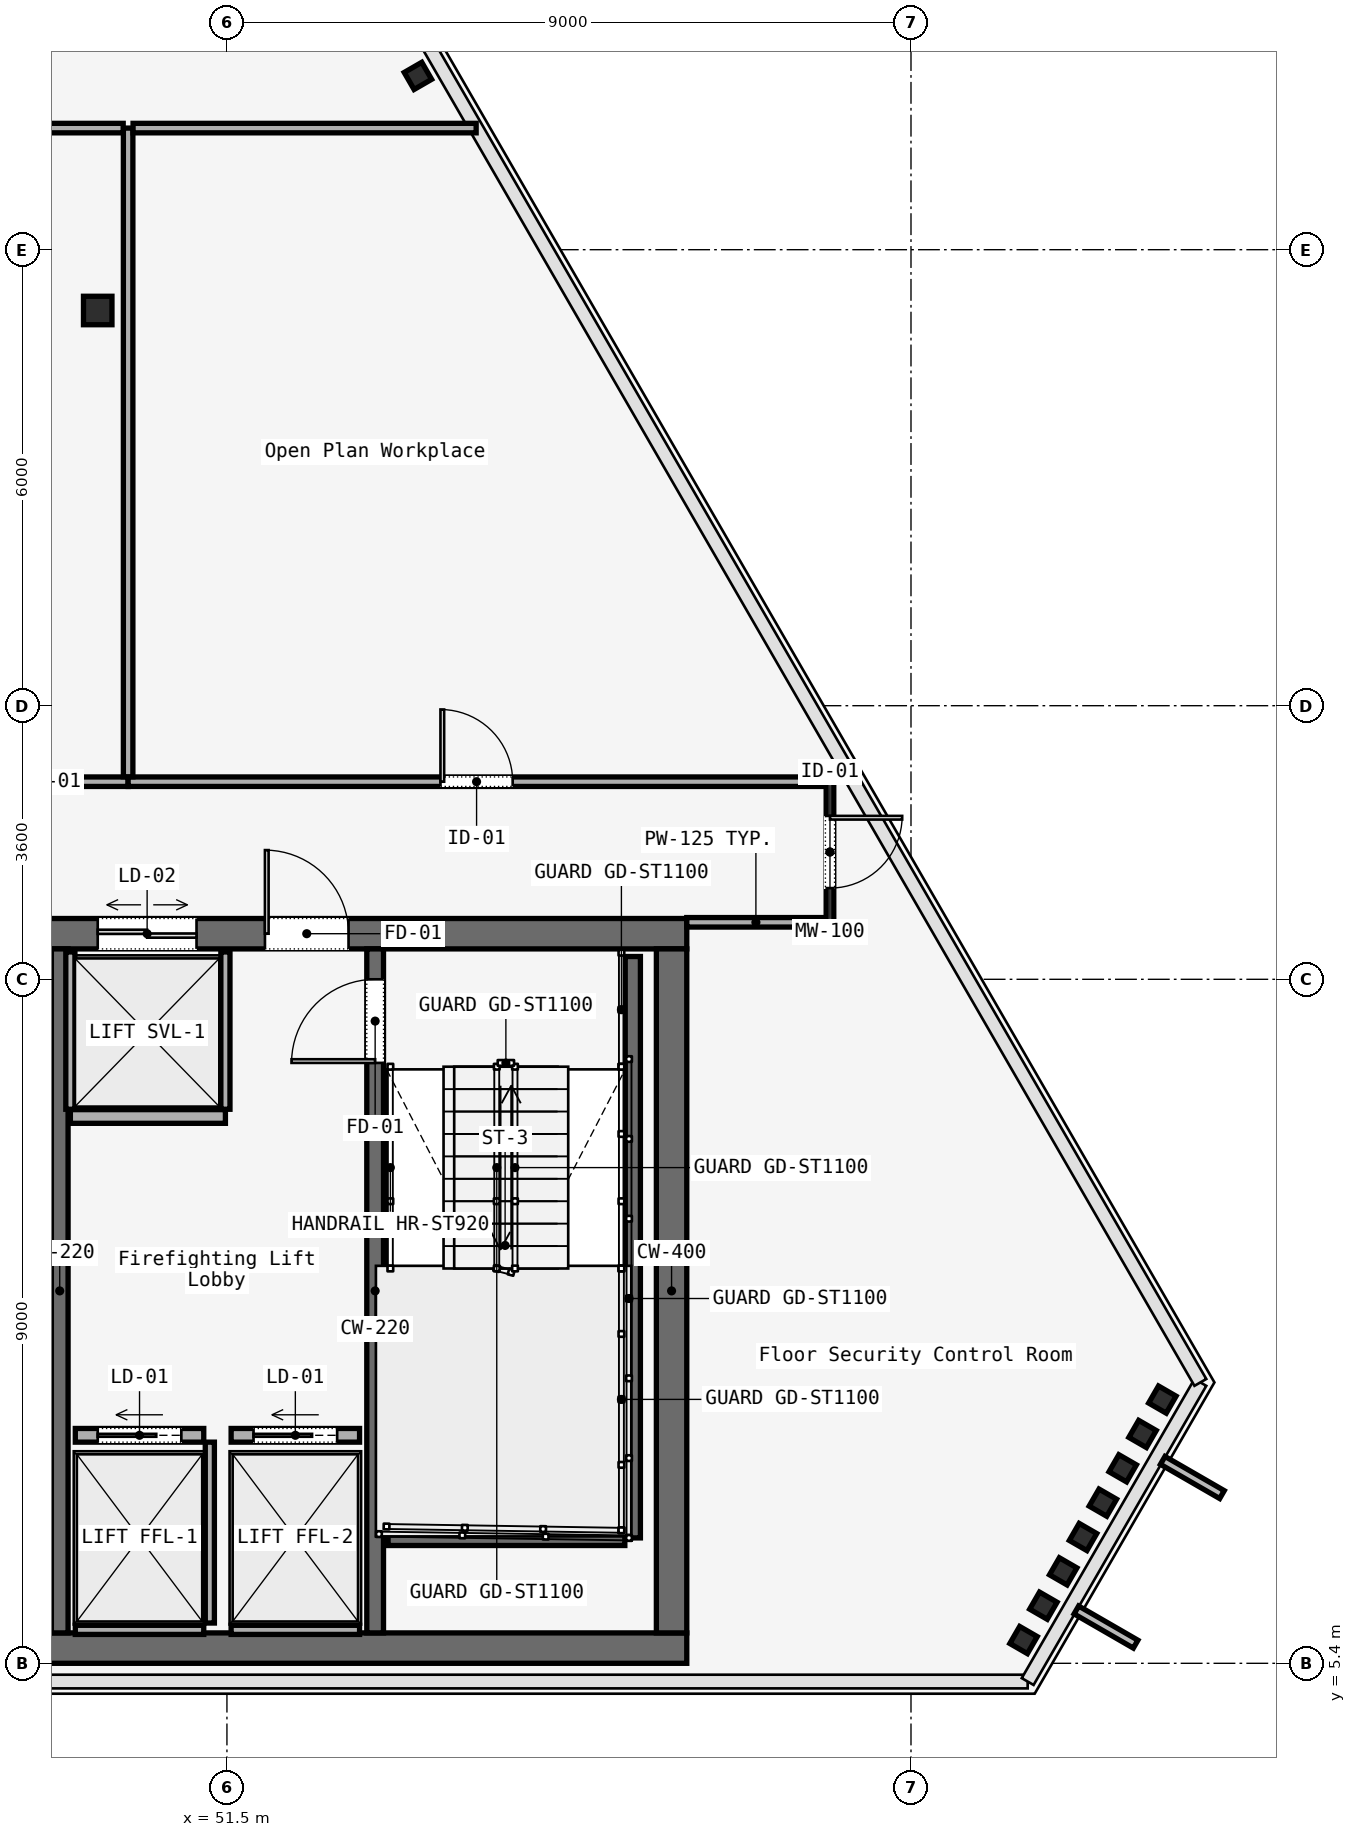
"""IFC4 building model, lengths in metres.
Left out: names, types, materials, properties, quantities, classifications, styles, units other than length and angle.
Written with IfcOpenShell. Run it as: python <this file> out.ifc"""

import sys

from ifc_helpers import new_model, si_unit, direction, frame, frame_2d, origin, origin_2d, place, context, subcontext, project, spatial, rectangle, i_section, extrude, element, fill, save


model = new_model("IFC4")
c1 = context("Model", 3, precision=1e-05, world=origin(), true_north=direction((0.0, 1.0)))
c2 = subcontext(c1, "Body", "Model", "MODEL_VIEW")
j1 = project(units=[si_unit("LENGTHUNIT", "METRE"), si_unit("PLANEANGLEUNIT", "RADIAN")], contexts=[c1])
p1 = place(None, origin())
s1 = spatial("IfcSite", under=j1, at=p1, CompositionType="ELEMENT")
p2 = place(p1, origin())
s2 = spatial("IfcBuilding", under=s1, at=p2, CompositionType="ELEMENT")
p3 = place(p2, frame((0.0, 0.0, 287.1)))
s3 = spatial("IfcBuildingStorey", under=s2, at=p3, CompositionType="ELEMENT", Elevation=287.1)
p4 = place(p3, frame((26.45, 15.0, 0.0), z_axis=(0.0, 0.0, 1.0), x_axis=(1.0, 0.0, 0.0)))
e1 = element("IfcWall", 1, at=p4, inside=s3, PredefinedType="SOLIDWALL", context=c2, shape_type="SweptSolid", body=[
    extrude(rectangle(XDim=31.1, YDim=0.4, at=frame_2d((15.55, 0.0))), origin(), (0.0, 0.0, 1.0), 3.58),
])
p5 = place(p4, frame((1.65, 0.0, 0.0)))
e2 = element("IfcOpeningElement", 2, at=p5, cuts=e1, PredefinedType="OPENING", context=c2, shape_type="SweptSolid", body=[
    extrude(rectangle(XDim=1.1, YDim=2.2, at=frame_2d((0.55, 1.1))), frame((0.0, 0.2, 0.0), z_axis=(0.0, -1.0, 0.0), x_axis=(1.0, 0.0, 0.0)), (0.0, 0.0, 1.0), 0.4),
])
p6 = place(p4, frame((13.65, 0.0, 0.0)))
e3 = element("IfcOpeningElement", 3, at=p6, cuts=e1, PredefinedType="OPENING", context=c2, shape_type="SweptSolid", body=[
    extrude(rectangle(XDim=1.1, YDim=2.2, at=frame_2d((0.55, 1.1))), frame((0.0, 0.2, 0.0), z_axis=(0.0, -1.0, 0.0), x_axis=(1.0, 0.0, 0.0)), (0.0, 0.0, 1.0), 0.4),
])
p7 = place(p4, frame((25.55, 0.0, 0.0)))
e4 = element("IfcOpeningElement", 4, at=p7, cuts=e1, PredefinedType="OPENING", context=c2, shape_type="SweptSolid", body=[
    extrude(rectangle(XDim=1.1, YDim=2.2, at=frame_2d((0.55, 1.1))), frame((0.0, 0.2, 0.0), z_axis=(0.0, -1.0, 0.0), x_axis=(1.0, 0.0, 0.0)), (0.0, 0.0, 1.0), 0.4),
])
p8 = place(p4, frame((19.35, 0.0, 0.0)))
e5 = element("IfcOpeningElement", 5, at=p8, cuts=e1, PredefinedType="OPENING", context=c2, shape_type="SweptSolid", body=[
    extrude(rectangle(XDim=1.1, YDim=2.2, at=frame_2d((0.55, 1.1))), frame((0.0, 0.2, 0.0), z_axis=(0.0, -1.0, 0.0), x_axis=(1.0, 0.0, 0.0)), (0.0, 0.0, 1.0), 0.4),
])
p9 = place(p4, frame((21.4, 0.0, 0.0)))
e6 = element("IfcOpeningElement", 6, at=p9, cuts=e1, PredefinedType="OPENING", context=c2, shape_type="SweptSolid", body=[
    extrude(rectangle(XDim=0.9, YDim=2.1, at=frame_2d((0.45, 1.05))), frame((0.0, 0.2, 0.0), z_axis=(0.0, -1.0, 0.0), x_axis=(1.0, 0.0, 0.0)), (0.0, 0.0, 1.0), 0.4),
])
p10 = place(p4, frame((6.04, 0.0, 0.0)))
e7 = element("IfcOpeningElement", 7, at=p10, cuts=e1, PredefinedType="OPENING", context=c2, shape_type="SweptSolid", body=[
    extrude(rectangle(XDim=0.95, YDim=2.2, at=frame_2d((0.475, 1.1))), frame((0.0, 0.2, 0.0), z_axis=(0.0, -1.0, 0.0), x_axis=(1.0, 0.0, 0.0)), (0.0, 0.0, 1.0), 0.4),
])
p11 = place(p4, frame((9.99, 0.0, 0.0)))
e8 = element("IfcOpeningElement", 8, at=p11, cuts=e1, PredefinedType="OPENING", context=c2, shape_type="SweptSolid", body=[
    extrude(rectangle(XDim=0.95, YDim=2.2, at=frame_2d((0.475, 1.1))), frame((0.0, 0.2, 0.0), z_axis=(0.0, -1.0, 0.0), x_axis=(1.0, 0.0, 0.0)), (0.0, 0.0, 1.0), 0.4),
])
p12 = place(p4, frame((23.35, 0.0, 0.0)))
e9 = element("IfcOpeningElement", 9, at=p12, cuts=e1, PredefinedType="OPENING", context=c2, shape_type="SweptSolid", body=[
    extrude(rectangle(XDim=1.3, YDim=2.3, at=frame_2d((0.65, 1.15))), frame((0.0, 0.2, 0.0), z_axis=(0.0, -1.0, 0.0), x_axis=(1.0, 0.0, 0.0)), (0.0, 0.0, 1.0), 0.4),
])
p13 = place(p3, frame((26.45, 5.6, 0.0), z_axis=(0.0, 0.0, 1.0), x_axis=(1.0, 0.0, 0.0)))
e10 = element("IfcWall", 10, at=p13, inside=s3, PredefinedType="SOLIDWALL", context=c2, shape_type="SweptSolid", body=[
    extrude(rectangle(XDim=31.1, YDim=0.4, at=frame_2d((15.55, 0.0))), origin(), (0.0, 0.0, 1.0), 3.58),
])
p14 = place(p3, frame((57.35, 5.8, 0.0), z_axis=(0.0, 0.0, 1.0), x_axis=(0.0, 1.0, 0.0)))
e11 = element("IfcWall", 11, at=p14, inside=s3, PredefinedType="SOLIDWALL", context=c2, shape_type="SweptSolid", body=[
    extrude(rectangle(XDim=9.0, YDim=0.4, at=frame_2d((4.5, 0.0))), origin(), (0.0, 0.0, 1.0), 3.58),
])
p15 = place(p3, frame((49.3, 5.8, 0.0), z_axis=(0.0, 0.0, 1.0), x_axis=(0.0, 1.0, 0.0)))
e12 = element("IfcWall", 12, at=p15, inside=s3, PredefinedType="SOLIDWALL", context=c2, shape_type="SweptSolid", body=[
    extrude(rectangle(XDim=9.0, YDim=0.22, at=frame_2d((4.5, 0.0))), origin(), (0.0, 0.0, 1.0), 3.58),
])
p16 = place(p3, frame((53.45, 5.8, 0.0), z_axis=(0.0, 0.0, 1.0), x_axis=(0.0, 1.0, 0.0)))
e13 = element("IfcWall", 13, at=p16, inside=s3, PredefinedType="SOLIDWALL", context=c2, shape_type="SweptSolid", body=[
    extrude(rectangle(XDim=9.0, YDim=0.22, at=frame_2d((4.5, 0.0))), origin(), (0.0, 0.0, 1.0), 3.58),
])
p17 = place(p16, frame((7.5, 0.0, 0.0)))
e14 = element("IfcOpeningElement", 14, at=p17, cuts=e13, PredefinedType="OPENING", context=c2, shape_type="SweptSolid", body=[
    extrude(rectangle(XDim=1.1, YDim=2.2, at=frame_2d((0.55, 1.1))), frame((0.0, 0.11, 0.0), z_axis=(0.0, -1.0, 0.0), x_axis=(1.0, 0.0, 0.0)), (0.0, 0.0, 1.0), 0.22),
])
p18 = place(p3, frame((49.8, 23.2, 0.0), z_axis=(0.0, 0.0, 1.0), x_axis=(1.0, 0.0, 0.0)))
e15 = element("IfcColumn", 15, at=p18, inside=s3, PredefinedType="COLUMN", context=c2, shape_type="SweptSolid", body=[
    extrude(i_section(OverallWidth=0.375, OverallDepth=0.375, WebThickness=0.017, FlangeThickness=0.027, FilletRadius=0.015, at=origin_2d()), origin(), (0.0, 0.0, 1.0), 3.58),
])
for number, where, z_axis, x_axis in (
    (16, (61.981, 5.706, 0.0), (0.0, 0.0, 1.0), (0.5, 0.866, 0.0)),
    (17, (62.242, 6.158, 0.0), (0.0, 0.0, 1.0), (0.5, 0.866, 0.0)),
    (18, (62.503, 6.61, 0.0), (0.0, 0.0, 1.0), (0.5, 0.866, 0.0)),
    (19, (62.764, 7.062, 0.0), (0.0, 0.0, 1.0), (0.5, 0.866, 0.0)),
    (20, (63.025, 7.514, 0.0), (0.0, 0.0, 1.0), (0.5, 0.866, 0.0)),
    (21, (63.286, 7.966, 0.0), (0.0, 0.0, 1.0), (0.5, 0.866, 0.0)),
    (22, (63.546, 8.418, 0.0), (0.0, 0.0, 1.0), (0.5, 0.866, 0.0)),
    (23, (63.807, 8.87, 0.0), (0.0, 0.0, 1.0), (0.5, 0.866, 0.0)),
    (24, (54.013, 26.287, 0.0), (0.0, 0.0, 1.0), (-0.5, 0.866, 0.0)),
):
    element("IfcColumn", number, at=place(p3, frame(where, z_axis=z_axis, x_axis=x_axis)), inside=s3, PredefinedType="COLUMN", context=c2, shape_type="SweptSolid", body=[
        extrude(i_section(OverallWidth=0.259, OverallDepth=0.267, WebThickness=0.013, FlangeThickness=0.021, FilletRadius=0.013, at=origin_2d()), origin(), (0.0, 0.0, 1.0), 3.58),
    ])
p19 = place(p3, frame((56.84, 14.7, 0.0), z_axis=(0.0, 0.0, 1.0), x_axis=(0.0, -1.0, 0.0)))
e25 = element("IfcWall", 25, at=p19, inside=s3, PredefinedType="SOLIDWALL", context=c2, shape_type="SweptSolid", body=[
    extrude(rectangle(XDim=7.65, YDim=0.2, at=frame_2d((3.825, 0.0))), origin(), (0.0, 0.0, 1.0), 3.8),
])
p20 = place(p3, frame((53.62, 7.05, 0.0), z_axis=(0.0, 0.0, 1.0), x_axis=(1.0, 0.0, 0.0)))
e26 = element("IfcWall", 26, at=p20, inside=s3, PredefinedType="SOLIDWALL", context=c2, shape_type="SweptSolid", body=[
    extrude(rectangle(XDim=3.115, YDim=0.2, at=frame_2d((1.558, 0.0))), origin(), (0.0, 0.0, 1.0), 3.8),
])
p21 = place(p3, frame((49.505, 8.4, 0.0), z_axis=(0.0, 0.0, 1.0), x_axis=(1.0, 0.0, 0.0)))
e27 = element("IfcWall", 27, at=p21, inside=s3, PredefinedType="SOLIDWALL", context=c2, shape_type="SweptSolid", body=[
    extrude(rectangle(XDim=1.69, YDim=0.18, at=frame_2d((0.845, 0.0))), origin(), (0.0, 0.0, 1.0), 3.01),
])
p22 = place(p21, frame((0.295, 0.0, 0.0)))
e28 = element("IfcOpeningElement", 28, at=p22, cuts=e27, PredefinedType="OPENING", context=c2, shape_type="SweptSolid", body=[
    extrude(rectangle(XDim=1.1, YDim=2.2, at=frame_2d((0.55, 1.1))), frame((0.0, 0.09, 0.0), z_axis=(0.0, -1.0, 0.0), x_axis=(1.0, 0.0, 0.0)), (0.0, 0.0, 1.0), 0.18),
])
p23 = place(p3, frame((49.505, 5.84, 0.0), z_axis=(0.0, 0.0, 1.0), x_axis=(1.0, 0.0, 0.0)))
e29 = element("IfcWall", 29, at=p23, inside=s3, PredefinedType="SOLIDWALL", context=c2, shape_type="SweptSolid", body=[
    extrude(rectangle(XDim=1.69, YDim=0.12, at=frame_2d((0.845, 0.0))), origin(), (0.0, 0.0, 1.0), 3.01),
])
p24 = place(p3, frame((51.275, 5.93, 0.0), z_axis=(0.0, 0.0, 1.0), x_axis=(0.0, 1.0, 0.0)))
e30 = element("IfcWall", 30, at=p24, inside=s3, PredefinedType="SOLIDWALL", context=c2, shape_type="SweptSolid", body=[
    extrude(rectangle(XDim=2.38, YDim=0.12, at=frame_2d((1.19, 0.0))), origin(), (0.0, 0.0, 1.0), 3.01),
])
p25 = place(p3, frame((51.555, 8.4, 0.0), z_axis=(0.0, 0.0, 1.0), x_axis=(1.0, 0.0, 0.0)))
e31 = element("IfcWall", 31, at=p25, inside=s3, PredefinedType="SOLIDWALL", context=c2, shape_type="SweptSolid", body=[
    extrude(rectangle(XDim=1.69, YDim=0.18, at=frame_2d((0.845, 0.0))), origin(), (0.0, 0.0, 1.0), 3.01),
])
p26 = place(p25, frame((0.295, 0.0, 0.0)))
e32 = element("IfcOpeningElement", 32, at=p26, cuts=e31, PredefinedType="OPENING", context=c2, shape_type="SweptSolid", body=[
    extrude(rectangle(XDim=1.1, YDim=2.2, at=frame_2d((0.55, 1.1))), frame((0.0, 0.09, 0.0), z_axis=(0.0, -1.0, 0.0), x_axis=(1.0, 0.0, 0.0)), (0.0, 0.0, 1.0), 0.18),
])
p27 = place(p3, frame((51.555, 5.84, 0.0), z_axis=(0.0, 0.0, 1.0), x_axis=(1.0, 0.0, 0.0)))
e33 = element("IfcWall", 33, at=p27, inside=s3, PredefinedType="SOLIDWALL", context=c2, shape_type="SweptSolid", body=[
    extrude(rectangle(XDim=1.69, YDim=0.12, at=frame_2d((0.845, 0.0))), origin(), (0.0, 0.0, 1.0), 3.01),
])
p28 = place(p3, frame((49.44, 12.595, 0.0), z_axis=(0.0, 0.0, 1.0), x_axis=(1.0, 0.0, 0.0)))
e34 = element("IfcWall", 34, at=p28, inside=s3, PredefinedType="SOLIDWALL", context=c2, shape_type="SweptSolid", body=[
    extrude(rectangle(XDim=2.04, YDim=0.18, at=frame_2d((1.02, 0.0))), origin(), (0.0, 0.0, 1.0), 3.01),
])
for number, where, z_axis, x_axis in (
    (35, (49.44, 12.69, 0.0), (0.0, 0.0, 1.0), (0.0, 1.0, 0.0)),
    (36, (51.48, 12.69, 0.0), (0.0, 0.0, 1.0), (0.0, 1.0, 0.0)),
):
    element("IfcWall", number, at=place(p3, frame(where, z_axis=z_axis, x_axis=x_axis)), inside=s3, PredefinedType="SOLIDWALL", context=c2, shape_type="SweptSolid", body=[
        extrude(rectangle(XDim=2.07, YDim=0.12, at=frame_2d((1.035, 0.0))), origin(), (0.0, 0.0, 1.0), 3.01),
    ])
p29 = place(p3, frame((59.434, 17.0, 0.0), z_axis=(0.0, 0.0, 1.0), x_axis=(0.0, -1.0, 0.0)))
e37 = element("IfcWall", 37, at=p29, inside=s3, PredefinedType="MOVABLE", context=c2, shape_type="SweptSolid", body=[
    extrude(rectangle(XDim=1.85, YDim=0.1, at=frame_2d((0.925, 0.0))), origin(), (0.0, 0.0, 1.0), 3.01),
])
p30 = place(p29, frame((0.45, 0.0, 0.0)))
e38 = element("IfcOpeningElement", 38, at=p30, cuts=e37, PredefinedType="OPENING", context=c2, shape_type="SweptSolid", body=[
    extrude(rectangle(XDim=0.95, YDim=2.2, at=frame_2d((0.475, 1.1))), frame((0.0, 0.05, 0.0), z_axis=(0.0, -1.0, 0.0), x_axis=(1.0, 0.0, 0.0)), (0.0, 0.0, 1.0), 0.1),
])
p31 = place(p3, frame((59.369, 15.15, 0.0), z_axis=(0.0, 0.0, 1.0), x_axis=(-1.0, 0.0, 0.0)))
e39 = element("IfcWall", 39, at=p31, inside=s3, PredefinedType="PARTITIONING", context=c2, shape_type="SweptSolid", body=[
    extrude(rectangle(XDim=1.819, YDim=0.125, at=frame_2d((0.909, 0.0))), origin(), (0.0, 0.0, 1.0), 3.01),
])
p32 = place(p3, frame((45.4, 17.0, 0.0), z_axis=(0.0, 0.0, 1.0), x_axis=(1.0, 0.0, 0.0)))
e40 = element("IfcWall", 40, at=p32, inside=s3, PredefinedType="PARTITIONING", context=c2, shape_type="SweptSolid", body=[
    extrude(rectangle(XDim=4.8, YDim=0.125, at=frame_2d((2.4, 0.0))), origin(), (0.0, 0.0, 1.0), 3.01),
])
p33 = place(p32, frame((1.925, 0.0, 0.0)))
e41 = element("IfcOpeningElement", 41, at=p33, cuts=e40, PredefinedType="OPENING", context=c2, shape_type="SweptSolid", body=[
    extrude(rectangle(XDim=0.95, YDim=2.2, at=frame_2d((0.475, 1.1))), frame((0.0, 0.062, 0.0), z_axis=(0.0, -1.0, 0.0), x_axis=(1.0, 0.0, 0.0)), (0.0, 0.0, 1.0), 0.125),
])
p34 = place(p3, frame((50.2, 17.0, 0.0), z_axis=(0.0, 0.0, 1.0), x_axis=(1.0, 0.0, 0.0)))
e42 = element("IfcWall", 42, at=p34, inside=s3, PredefinedType="PARTITIONING", context=c2, shape_type="SweptSolid", body=[
    extrude(rectangle(XDim=9.169, YDim=0.125, at=frame_2d((4.584, 0.0))), origin(), (0.0, 0.0, 1.0), 3.01),
])
p35 = place(p34, frame((4.11, 0.0, 0.0)))
e43 = element("IfcOpeningElement", 43, at=p35, cuts=e42, PredefinedType="OPENING", context=c2, shape_type="SweptSolid", body=[
    extrude(rectangle(XDim=0.95, YDim=2.2, at=frame_2d((0.475, 1.1))), frame((0.0, 0.062, 0.0), z_axis=(0.0, -1.0, 0.0), x_axis=(1.0, 0.0, 0.0)), (0.0, 0.0, 1.0), 0.125),
])
p36 = place(p3, frame((50.2, 17.065, 0.0), z_axis=(0.0, 0.0, 1.0), x_axis=(0.0, 1.0, 0.0)))
e44 = element("IfcWall", 44, at=p36, inside=s3, PredefinedType="PARTITIONING", context=c2, shape_type="SweptSolid", body=[
    extrude(rectangle(XDim=8.535, YDim=0.125, at=frame_2d((4.268, 0.0))), origin(), (0.0, 0.0, 1.0), 3.01),
])
p37 = place(p3, frame((50.265, 25.6, 0.0), z_axis=(0.0, 0.0, 1.0), x_axis=(1.0, 0.0, 0.0)))
e45 = element("IfcWall", 45, at=p37, inside=s3, PredefinedType="PARTITIONING", context=c2, shape_type="SweptSolid", body=[
    extrude(rectangle(XDim=4.514, YDim=0.125, at=frame_2d((2.257, 0.0))), origin(), (0.0, 0.0, 1.0), 3.01),
])
p38 = place(p3, frame((47.2, 25.6, 0.0), z_axis=(0.0, 0.0, 1.0), x_axis=(1.0, 0.0, 0.0)))
e46 = element("IfcWall", 46, at=p38, inside=s3, PredefinedType="PARTITIONING", context=c2, shape_type="SweptSolid", body=[
    extrude(rectangle(XDim=2.935, YDim=0.125, at=frame_2d((1.468, 0.0))), origin(), (0.0, 0.0, 1.0), 3.01),
])
p39 = place(p7, origin())
e47 = element("IfcDoor", 47, at=p39, inside=s3, OperationType="SINGLE_SWING_RIGHT", PredefinedType="DOOR", context=c2, shape_type="SweptSolid", body=[
    extrude(rectangle(XDim=1.1, YDim=2.2, at=frame_2d((0.55, 1.1))), frame((0.0, 0.025, 0.0), z_axis=(0.0, -1.0, 0.0), x_axis=(1.0, 0.0, 0.0)), (0.0, 0.0, 1.0), 0.05),
])
fill(e4, e47)
p40 = place(p17, origin())
e48 = element("IfcDoor", 48, at=p40, inside=s3, OperationType="SINGLE_SWING_LEFT", PredefinedType="DOOR", context=c2, shape_type="SweptSolid", body=[
    extrude(rectangle(XDim=1.1, YDim=2.2, at=frame_2d((0.55, 1.1))), frame((0.0, 0.025, 0.0), z_axis=(0.0, -1.0, 0.0), x_axis=(1.0, 0.0, 0.0)), (0.0, 0.0, 1.0), 0.05),
])
fill(e14, e48)
p41 = place(p22, origin())
e49 = element("IfcDoor", 49, at=p41, inside=s3, OperationType="SLIDING_TO_LEFT", PredefinedType="DOOR", context=c2, shape_type="SweptSolid", body=[
    extrude(rectangle(XDim=1.1, YDim=2.2, at=frame_2d((0.55, 1.1))), frame((0.0, 0.025, 0.0), z_axis=(0.0, -1.0, 0.0), x_axis=(1.0, 0.0, 0.0)), (0.0, 0.0, 1.0), 0.05),
])
fill(e28, e49)
p42 = place(p26, origin())
e50 = element("IfcDoor", 50, at=p42, inside=s3, OperationType="SLIDING_TO_LEFT", PredefinedType="DOOR", context=c2, shape_type="SweptSolid", body=[
    extrude(rectangle(XDim=1.1, YDim=2.2, at=frame_2d((0.55, 1.1))), frame((0.0, 0.025, 0.0), z_axis=(0.0, -1.0, 0.0), x_axis=(1.0, 0.0, 0.0)), (0.0, 0.0, 1.0), 0.05),
])
fill(e32, e50)
p43 = place(p12, origin())
e51 = element("IfcDoor", 51, at=p43, inside=s3, OperationType="DOUBLE_DOOR_SLIDING", PredefinedType="DOOR", context=c2, shape_type="SweptSolid", body=[
    extrude(rectangle(XDim=1.3, YDim=2.3, at=frame_2d((0.65, 1.15))), frame((0.0, 0.025, 0.0), z_axis=(0.0, -1.0, 0.0), x_axis=(1.0, 0.0, 0.0)), (0.0, 0.0, 1.0), 0.05),
])
fill(e9, e51)
p44 = place(p30, origin())
e52 = element("IfcDoor", 52, at=p44, inside=s3, OperationType="SINGLE_SWING_RIGHT", PredefinedType="DOOR", context=c2, shape_type="SweptSolid", body=[
    extrude(rectangle(XDim=0.95, YDim=2.2, at=frame_2d((0.475, 1.1))), frame((0.0, 0.025, 0.0), z_axis=(0.0, -1.0, 0.0), x_axis=(1.0, 0.0, 0.0)), (0.0, 0.0, 1.0), 0.05),
])
fill(e38, e52)
p45 = place(p35, origin())
e53 = element("IfcDoor", 53, at=p45, inside=s3, OperationType="SINGLE_SWING_RIGHT", PredefinedType="DOOR", context=c2, shape_type="SweptSolid", body=[
    extrude(rectangle(XDim=0.95, YDim=2.2, at=frame_2d((0.475, 1.1))), frame((0.0, 0.025, 0.0), z_axis=(0.0, -1.0, 0.0), x_axis=(1.0, 0.0, 0.0)), (0.0, 0.0, 1.0), 0.05),
])
fill(e43, e53)
save(model, sys.argv[1])
